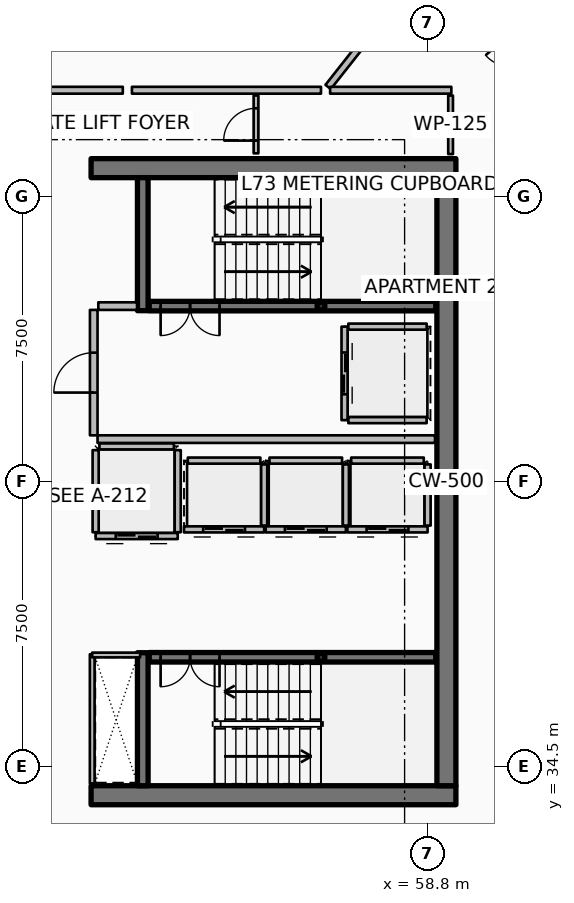
"""IFC4 building model, lengths in metres.
Left out: names, types, materials, properties, quantities, classifications, styles, units other than length and angle.
Written with IfcOpenShell. Run it as: python <this file> out.ifc"""

import sys

from ifc_helpers import new_model, si_unit, direction, frame, frame_2d, origin, origin_2d, place, context, subcontext, project, spatial, rectangle, hollow_rectangle, extrude, element, fill, save


model = new_model("IFC4")
c1 = context("Model", 3, precision=1e-05, world=origin(), true_north=direction((0.0, 1.0)))
c2 = subcontext(c1, "Body", "Model", "MODEL_VIEW")
j1 = project(units=[si_unit("LENGTHUNIT", "METRE"), si_unit("PLANEANGLEUNIT", "RADIAN")], contexts=[c1])
p1 = place(None, origin())
s1 = spatial("IfcSite", under=j1, at=p1, CompositionType="ELEMENT")
p2 = place(p1, origin())
s2 = spatial("IfcBuilding", under=s1, at=p2, CompositionType="ELEMENT")
p3 = place(p2, frame((0.0, 0.0, 290.6)))
s3 = spatial("IfcBuildingStorey", under=s2, at=p3, CompositionType="ELEMENT", Elevation=290.6)
for number, where, z_axis, x_axis in (
    (1, (49.95, 33.75, 0.0), (0.0, 0.0, 1.0), (1.0, 0.0, 0.0)),
    (2, (49.95, 50.25, 0.0), (0.0, 0.0, 1.0), (1.0, 0.0, 0.0)),
):
    element("IfcWall", number, at=place(p3, frame(where, z_axis=z_axis, x_axis=x_axis)), inside=s3, PredefinedType="SHEAR", context=c2, shape_type="SweptSolid", body=[
        extrude(rectangle(XDim=9.6, YDim=0.5, at=frame_2d((4.8, 0.0))), origin(), (0.0, 0.0, 1.0), 3.85),
    ])
p4 = place(p3, frame((59.3, 34.0, 0.0), z_axis=(0.0, 0.0, 1.0), x_axis=(0.0, 1.0, 0.0)))
e3 = element("IfcWall", 3, at=p4, inside=s3, PredefinedType="SHEAR", context=c2, shape_type="SweptSolid", body=[
    extrude(rectangle(XDim=16.0, YDim=0.5, at=frame_2d((8.0, 0.0))), origin(), (0.0, 0.0, 1.0), 3.85),
])
for number, where, z_axis, x_axis in (
    (4, (51.31, 46.5, 0.0), (0.0, 0.0, 1.0), (0.0, 1.0, 0.0)),
    (5, (51.31, 34.0, 0.0), (0.0, 0.0, 1.0), (0.0, 1.0, 0.0)),
):
    element("IfcWall", number, at=place(p3, frame(where, z_axis=z_axis, x_axis=x_axis)), inside=s3, PredefinedType="SHEAR", context=c2, shape_type="SweptSolid", body=[
        extrude(rectangle(XDim=3.5, YDim=0.28, at=frame_2d((1.75, 0.0))), origin(), (0.0, 0.0, 1.0), 3.85),
    ])
for number, where, z_axis, x_axis in (
    (6, (56.0, 46.62, 0.0), (0.0, 0.0, 1.0), (1.0, 0.0, 0.0)),
    (7, (56.0, 37.38, 0.0), (0.0, 0.0, 1.0), (1.0, 0.0, 0.0)),
):
    element("IfcColumn", number, at=place(p3, frame(where, z_axis=z_axis, x_axis=x_axis)), inside=s3, PredefinedType="COLUMN", context=c2, shape_type="SweptSolid", body=[
        extrude(hollow_rectangle(XDim=0.2, YDim=0.2, WallThickness=0.01, InnerFilletRadius=0.01, OuterFilletRadius=0.02, at=origin_2d()), origin(), (0.0, 0.0, 1.0), 1.72),
    ])
p5 = place(p3, frame((51.48, 46.62, 0.0), z_axis=(0.0, 0.0, 1.0), x_axis=(1.0, 0.0, 0.0)))
e8 = element("IfcWall", 8, at=p5, inside=s3, PredefinedType="SOLIDWALL", context=c2, shape_type="SweptSolid", body=[
    extrude(rectangle(XDim=7.54, YDim=0.25, at=frame_2d((3.77, 0.0))), origin(), (0.0, 0.0, 1.0), 3.59),
])
p6 = place(p5, frame((0.3, 0.0, 0.0)))
e9 = element("IfcOpeningElement", 9, at=p6, cuts=e8, PredefinedType="OPENING", context=c2, shape_type="SweptSolid", body=[
    extrude(rectangle(XDim=1.55, YDim=2.15, at=frame_2d((0.775, 1.075))), frame((0.0, 0.135, 0.0), z_axis=(0.0, -1.0, 0.0), x_axis=(1.0, 0.0, 0.0)), (0.0, 0.0, 1.0), 0.27),
])
p7 = place(p3, frame((51.48, 37.38, 0.0), z_axis=(0.0, 0.0, 1.0), x_axis=(1.0, 0.0, 0.0)))
e10 = element("IfcWall", 10, at=p7, inside=s3, PredefinedType="SOLIDWALL", context=c2, shape_type="SweptSolid", body=[
    extrude(rectangle(XDim=7.54, YDim=0.25, at=frame_2d((3.77, 0.0))), origin(), (0.0, 0.0, 1.0), 3.59),
])
p8 = place(p7, frame((0.3, 0.0, 0.0)))
e11 = element("IfcOpeningElement", 11, at=p8, cuts=e10, PredefinedType="OPENING", context=c2, shape_type="SweptSolid", body=[
    extrude(rectangle(XDim=1.55, YDim=2.15, at=frame_2d((0.775, 1.075))), frame((0.0, 0.135, 0.0), z_axis=(0.0, -1.0, 0.0), x_axis=(1.0, 0.0, 0.0)), (0.0, 0.0, 1.0), 0.27),
])
p9 = place(p3, frame((54.505, 40.745, 0.0), z_axis=(0.0, 0.0, 1.0), x_axis=(-1.0, 0.0, 0.0)))
e12 = element("IfcWall", 12, at=p9, inside=s3, PredefinedType="PARTITIONING", context=c2, shape_type="SweptSolid", body=[
    extrude(rectangle(XDim=2.11, YDim=0.16, at=frame_2d((1.055, 0.0))), origin(), (0.0, 0.0, 1.0), 3.59),
])
p10 = place(p9, frame((0.505, 0.0, 0.0)))
e13 = element("IfcOpeningElement", 13, at=p10, cuts=e12, PredefinedType="OPENING", context=c2, shape_type="SweptSolid", body=[
    extrude(rectangle(XDim=1.1, YDim=2.1, at=frame_2d((0.55, 1.05))), frame((0.0, 0.09, 0.0), z_axis=(0.0, -1.0, 0.0), x_axis=(1.0, 0.0, 0.0)), (0.0, 0.0, 1.0), 0.18),
])
p11 = place(p3, frame((54.505, 40.845, 0.0), z_axis=(0.0, 0.0, 1.0), x_axis=(0.0, 1.0, 0.0)))
e14 = element("IfcWall", 14, at=p11, inside=s3, PredefinedType="PARTITIONING", context=c2, shape_type="SweptSolid", body=[
    extrude(rectangle(XDim=1.61, YDim=0.16, at=frame_2d((0.805, 0.0))), origin(), (0.0, 0.0, 1.0), 3.59),
])
p12 = place(p3, frame((52.495, 42.555, 0.0), z_axis=(0.0, 0.0, 1.0), x_axis=(1.0, 0.0, 0.0)))
e15 = element("IfcWall", 15, at=p12, inside=s3, PredefinedType="PARTITIONING", context=c2, shape_type="SweptSolid", body=[
    extrude(rectangle(XDim=1.91, YDim=0.16, at=frame_2d((0.955, 0.0))), origin(), (0.0, 0.0, 1.0), 3.59),
])
p13 = place(p3, frame((56.655, 40.745, 0.0), z_axis=(0.0, 0.0, 1.0), x_axis=(-1.0, 0.0, 0.0)))
e16 = element("IfcWall", 16, at=p13, inside=s3, PredefinedType="PARTITIONING", context=c2, shape_type="SweptSolid", body=[
    extrude(rectangle(XDim=2.11, YDim=0.16, at=frame_2d((1.055, 0.0))), origin(), (0.0, 0.0, 1.0), 3.59),
])
p14 = place(p13, frame((0.505, 0.0, 0.0)))
e17 = element("IfcOpeningElement", 17, at=p14, cuts=e16, PredefinedType="OPENING", context=c2, shape_type="SweptSolid", body=[
    extrude(rectangle(XDim=1.1, YDim=2.1, at=frame_2d((0.55, 1.05))), frame((0.0, 0.09, 0.0), z_axis=(0.0, -1.0, 0.0), x_axis=(1.0, 0.0, 0.0)), (0.0, 0.0, 1.0), 0.18),
])
p15 = place(p3, frame((56.655, 40.845, 0.0), z_axis=(0.0, 0.0, 1.0), x_axis=(0.0, 1.0, 0.0)))
e18 = element("IfcWall", 18, at=p15, inside=s3, PredefinedType="PARTITIONING", context=c2, shape_type="SweptSolid", body=[
    extrude(rectangle(XDim=1.61, YDim=0.16, at=frame_2d((0.805, 0.0))), origin(), (0.0, 0.0, 1.0), 3.59),
])
p16 = place(p3, frame((54.645, 42.555, 0.0), z_axis=(0.0, 0.0, 1.0), x_axis=(1.0, 0.0, 0.0)))
e19 = element("IfcWall", 19, at=p16, inside=s3, PredefinedType="PARTITIONING", context=c2, shape_type="SweptSolid", body=[
    extrude(rectangle(XDim=1.91, YDim=0.16, at=frame_2d((0.955, 0.0))), origin(), (0.0, 0.0, 1.0), 3.59),
])
p17 = place(p3, frame((58.805, 40.745, 0.0), z_axis=(0.0, 0.0, 1.0), x_axis=(-1.0, 0.0, 0.0)))
e20 = element("IfcWall", 20, at=p17, inside=s3, PredefinedType="PARTITIONING", context=c2, shape_type="SweptSolid", body=[
    extrude(rectangle(XDim=2.11, YDim=0.16, at=frame_2d((1.055, 0.0))), origin(), (0.0, 0.0, 1.0), 3.59),
])
p18 = place(p17, frame((0.505, 0.0, 0.0)))
e21 = element("IfcOpeningElement", 21, at=p18, cuts=e20, PredefinedType="OPENING", context=c2, shape_type="SweptSolid", body=[
    extrude(rectangle(XDim=1.1, YDim=2.1, at=frame_2d((0.55, 1.05))), frame((0.0, 0.09, 0.0), z_axis=(0.0, -1.0, 0.0), x_axis=(1.0, 0.0, 0.0)), (0.0, 0.0, 1.0), 0.18),
])
p19 = place(p3, frame((58.805, 40.845, 0.0), z_axis=(0.0, 0.0, 1.0), x_axis=(0.0, 1.0, 0.0)))
e22 = element("IfcWall", 22, at=p19, inside=s3, PredefinedType="PARTITIONING", context=c2, shape_type="SweptSolid", body=[
    extrude(rectangle(XDim=1.61, YDim=0.16, at=frame_2d((0.805, 0.0))), origin(), (0.0, 0.0, 1.0), 3.59),
])
p20 = place(p3, frame((56.795, 42.555, 0.0), z_axis=(0.0, 0.0, 1.0), x_axis=(1.0, 0.0, 0.0)))
e23 = element("IfcWall", 23, at=p20, inside=s3, PredefinedType="PARTITIONING", context=c2, shape_type="SweptSolid", body=[
    extrude(rectangle(XDim=1.91, YDim=0.16, at=frame_2d((0.955, 0.0))), origin(), (0.0, 0.0, 1.0), 3.59),
])
p21 = place(p3, frame((56.62, 46.08, 0.0), z_axis=(0.0, 0.0, 1.0), x_axis=(0.0, -1.0, 0.0)))
e24 = element("IfcWall", 24, at=p21, inside=s3, PredefinedType="PARTITIONING", context=c2, shape_type="SweptSolid", body=[
    extrude(rectangle(XDim=2.46, YDim=0.16, at=frame_2d((1.23, 0.0))), origin(), (0.0, 0.0, 1.0), 3.59),
])
p22 = place(p21, frame((0.68, 0.0, 0.0)))
e25 = element("IfcOpeningElement", 25, at=p22, cuts=e24, PredefinedType="OPENING", context=c2, shape_type="SweptSolid", body=[
    extrude(rectangle(XDim=1.1, YDim=2.1, at=frame_2d((0.55, 1.05))), frame((0.0, 0.09, 0.0), z_axis=(0.0, -1.0, 0.0), x_axis=(1.0, 0.0, 0.0)), (0.0, 0.0, 1.0), 0.18),
])
for number, where, z_axis, x_axis in (
    (26, (56.72, 46.08, 0.0), (0.0, 0.0, 1.0), (1.0, 0.0, 0.0)),
    (27, (56.72, 43.62, 0.0), (0.0, 0.0, 1.0), (1.0, 0.0, 0.0)),
):
    element("IfcWall", number, at=place(p3, frame(where, z_axis=z_axis, x_axis=x_axis)), inside=s3, PredefinedType="PARTITIONING", context=c2, shape_type="SweptSolid", body=[
        extrude(rectangle(XDim=2.06, YDim=0.16, at=frame_2d((1.03, 0.0))), origin(), (0.0, 0.0, 1.0), 3.59),
    ])
p23 = place(p3, frame((52.23, 40.57, 0.0), z_axis=(0.0, 0.0, 1.0), x_axis=(-1.0, 0.0, 0.0)))
e28 = element("IfcWall", 28, at=p23, inside=s3, PredefinedType="PARTITIONING", context=c2, shape_type="SweptSolid", body=[
    extrude(rectangle(XDim=2.16, YDim=0.16, at=frame_2d((1.08, 0.0))), origin(), (0.0, 0.0, 1.0), 3.59),
])
p24 = place(p23, frame((0.53, 0.0, 0.0)))
e29 = element("IfcOpeningElement", 29, at=p24, cuts=e28, PredefinedType="OPENING", context=c2, shape_type="SweptSolid", body=[
    extrude(rectangle(XDim=1.1, YDim=2.1, at=frame_2d((0.55, 1.05))), frame((0.0, 0.09, 0.0), z_axis=(0.0, -1.0, 0.0), x_axis=(1.0, 0.0, 0.0)), (0.0, 0.0, 1.0), 0.18),
])
for number, where, z_axis, x_axis in (
    (30, (52.23, 40.67, 0.0), (0.0, 0.0, 1.0), (0.0, 1.0, 0.0)),
    (31, (50.07, 40.67, 0.0), (0.0, 0.0, 1.0), (0.0, 1.0, 0.0)),
):
    element("IfcWall", number, at=place(p3, frame(where, z_axis=z_axis, x_axis=x_axis)), inside=s3, PredefinedType="PARTITIONING", context=c2, shape_type="SweptSolid", body=[
        extrude(rectangle(XDim=2.16, YDim=0.16, at=frame_2d((1.08, 0.0))), origin(), (0.0, 0.0, 1.0), 3.59),
    ])
p25 = place(p3, frame((50.17, 42.93, 0.0), z_axis=(0.0, 0.0, 1.0), x_axis=(1.0, 0.0, 0.0)))
e32 = element("IfcWall", 32, at=p25, inside=s3, PredefinedType="PARTITIONING", context=c2, shape_type="SweptSolid", body=[
    extrude(rectangle(XDim=1.96, YDim=0.16, at=frame_2d((0.98, 0.0))), origin(), (0.0, 0.0, 1.0), 3.59),
])
p26 = place(p3, frame((50.12, 43.12, 0.0), z_axis=(0.0, 0.0, 1.0), x_axis=(1.0, 0.0, 0.0)))
e33 = element("IfcWall", 33, at=p26, inside=s3, PredefinedType="PARTITIONING", context=c2, shape_type="SweptSolid", body=[
    extrude(rectangle(XDim=8.88, YDim=0.2, at=frame_2d((4.44, 0.0))), origin(), (0.0, 0.0, 1.0), 3.59),
])
p27 = place(p3, frame((50.14, 46.62, 0.0), z_axis=(0.0, 0.0, 1.0), x_axis=(1.0, 0.0, 0.0)))
e34 = element("IfcWall", 34, at=p27, inside=s3, PredefinedType="PARTITIONING", context=c2, shape_type="SweptSolid", body=[
    extrude(rectangle(XDim=1.02, YDim=0.2, at=frame_2d((0.51, 0.0))), origin(), (0.0, 0.0, 1.0), 3.59),
])
p28 = place(p3, frame((50.02, 43.22, 0.0), z_axis=(0.0, 0.0, 1.0), x_axis=(0.0, 1.0, 0.0)))
e35 = element("IfcWall", 35, at=p28, inside=s3, PredefinedType="PARTITIONING", context=c2, shape_type="SweptSolid", body=[
    extrude(rectangle(XDim=3.3, YDim=0.2, at=frame_2d((1.65, 0.0))), origin(), (0.0, 0.0, 1.0), 3.59),
])
p29 = place(p28, frame((1.125, 0.0, 0.0)))
e36 = element("IfcOpeningElement", 36, at=p29, cuts=e35, PredefinedType="OPENING", context=c2, shape_type="SweptSolid", body=[
    extrude(rectangle(XDim=1.05, YDim=2.1, at=frame_2d((0.525, 1.05))), frame((0.0, 0.11, 0.0), z_axis=(0.0, -1.0, 0.0), x_axis=(1.0, 0.0, 0.0)), (0.0, 0.0, 1.0), 0.22),
])
p30 = place(p3, frame((49.98, 34.06, 0.0), z_axis=(0.0, 0.0, 1.0), x_axis=(0.0, 1.0, 0.0)))
e37 = element("IfcWall", 37, at=p30, inside=s3, PredefinedType="PARTITIONING", context=c2, shape_type="SweptSolid", body=[
    extrude(rectangle(XDim=3.4, YDim=0.125, at=frame_2d((1.7, 0.0))), origin(), (0.0, 0.0, 1.0), 3.03),
])
p31 = place(p3, frame((49.98, 37.44, 0.0), z_axis=(0.0, 0.0, 1.0), x_axis=(1.0, 0.0, 0.0)))
e38 = element("IfcWall", 38, at=p31, inside=s3, PredefinedType="PARTITIONING", context=c2, shape_type="SweptSolid", body=[
    extrude(rectangle(XDim=1.26, YDim=0.125, at=frame_2d((0.63, 0.0))), origin(), (0.0, 0.0, 1.0), 3.03),
])
p32 = place(p3, frame((59.41, 50.62, 0.0), z_axis=(0.0, 0.0, 1.0), x_axis=(0.0, 1.0, 0.0)))
e39 = element("IfcWall", 39, at=p32, inside=s3, PredefinedType="PARTITIONING", context=c2, shape_type="SweptSolid", body=[
    extrude(rectangle(XDim=1.54, YDim=0.125, at=frame_2d((0.77, 0.0))), origin(), (0.0, 0.0, 1.0), 3.03),
])
p33 = place(p3, frame((54.29, 50.64, 0.0), z_axis=(0.0, 0.0, 1.0), x_axis=(0.0, 1.0, 0.0)))
e40 = element("IfcWall", 40, at=p33, inside=s3, PredefinedType="PARTITIONING", context=c2, shape_type="SweptSolid", body=[
    extrude(rectangle(XDim=1.52, YDim=0.125, at=frame_2d((0.76, 0.0))), origin(), (0.0, 0.0, 1.0), 3.03),
])
p34 = place(p33, frame((0.335, 0.0, 0.0)))
e41 = element("IfcOpeningElement", 41, at=p34, cuts=e40, PredefinedType="OPENING", context=c2, shape_type="SweptSolid", body=[
    extrude(rectangle(XDim=0.85, YDim=2.06, at=frame_2d((0.425, 1.03))), frame((0.0, 0.073, 0.0), z_axis=(0.0, -1.0, 0.0), x_axis=(1.0, 0.0, 0.0)), (0.0, 0.0, 1.0), 0.145),
])
p35 = place(p3, frame((56.188, 52.386, 0.0), z_axis=(0.0, 0.0, 1.0), x_axis=(0.619097230176, 0.785314344443, 0.0)))
e42 = element("IfcWall", 42, at=p35, inside=s3, PredefinedType="PARTITIONING", context=c2, shape_type="SweptSolid", body=[
    extrude(rectangle(XDim=16.37, YDim=0.18, at=frame_2d((8.185, 0.0))), origin(), (0.0, 0.0, 1.0), 2.957),
])
p36 = place(p3, frame((56.0, 52.3, 0.0), z_axis=(0.0, 0.0, 1.0), x_axis=(-1.0, 0.0, 0.0)))
e43 = element("IfcWall", 43, at=p36, inside=s3, PredefinedType="PARTITIONING", context=c2, shape_type="SweptSolid", body=[
    extrude(rectangle(XDim=4.975, YDim=0.18, at=frame_2d((2.488, 0.0))), origin(), (0.0, 0.0, 1.0), 2.957),
])
p37 = place(p3, frame((50.785, 52.3, 0.0), z_axis=(0.0, 0.0, 1.0), x_axis=(-1.0, 0.0, 0.0)))
e44 = element("IfcWall", 44, at=p37, inside=s3, PredefinedType="PARTITIONING", context=c2, shape_type="SweptSolid", body=[
    extrude(rectangle(XDim=3.884, YDim=0.18, at=frame_2d((1.942, 0.0))), origin(), (0.0, 0.0, 1.0), 2.957),
])
p38 = place(p3, frame((59.43, 52.3, 0.0), z_axis=(0.0, 0.0, 1.0), x_axis=(-1.0, 0.0, 0.0)))
e45 = element("IfcWall", 45, at=p38, inside=s3, PredefinedType="PARTITIONING", context=c2, shape_type="SweptSolid", body=[
    extrude(rectangle(XDim=3.19, YDim=0.18, at=frame_2d((1.595, 0.0))), origin(), (0.0, 0.0, 1.0), 2.957),
])
p39 = place(p6, origin())
e46 = element("IfcDoor", 46, at=p39, inside=s3, OperationType="DOUBLE_DOOR_SINGLE_SWING", PredefinedType="DOOR", context=c2, shape_type="SweptSolid", body=[
    extrude(rectangle(XDim=1.55, YDim=2.15, at=frame_2d((0.775, 1.075))), frame((0.0, 0.025, 0.0), z_axis=(0.0, -1.0, 0.0), x_axis=(1.0, 0.0, 0.0)), (0.0, 0.0, 1.0), 0.05),
])
fill(e9, e46)
p40 = place(p8, origin())
e47 = element("IfcDoor", 47, at=p40, inside=s3, OperationType="DOUBLE_DOOR_SINGLE_SWING", PredefinedType="DOOR", context=c2, shape_type="SweptSolid", body=[
    extrude(rectangle(XDim=1.55, YDim=2.15, at=frame_2d((0.775, 1.075))), frame((0.0, 0.025, 0.0), z_axis=(0.0, -1.0, 0.0), x_axis=(1.0, 0.0, 0.0)), (0.0, 0.0, 1.0), 0.05),
])
fill(e11, e47)
p41 = place(p10, origin())
e48 = element("IfcDoor", 48, at=p41, inside=s3, OperationType="DOUBLE_DOOR_SLIDING", PredefinedType="DOOR", context=c2, shape_type="SweptSolid", body=[
    extrude(rectangle(XDim=1.1, YDim=2.1, at=frame_2d((0.55, 1.05))), frame((0.0, 0.025, 0.0), z_axis=(0.0, -1.0, 0.0), x_axis=(1.0, 0.0, 0.0)), (0.0, 0.0, 1.0), 0.05),
])
fill(e13, e48)
p42 = place(p14, origin())
e49 = element("IfcDoor", 49, at=p42, inside=s3, OperationType="DOUBLE_DOOR_SLIDING", PredefinedType="DOOR", context=c2, shape_type="SweptSolid", body=[
    extrude(rectangle(XDim=1.1, YDim=2.1, at=frame_2d((0.55, 1.05))), frame((0.0, 0.025, 0.0), z_axis=(0.0, -1.0, 0.0), x_axis=(1.0, 0.0, 0.0)), (0.0, 0.0, 1.0), 0.05),
])
fill(e17, e49)
p43 = place(p18, origin())
e50 = element("IfcDoor", 50, at=p43, inside=s3, OperationType="DOUBLE_DOOR_SLIDING", PredefinedType="DOOR", context=c2, shape_type="SweptSolid", body=[
    extrude(rectangle(XDim=1.1, YDim=2.1, at=frame_2d((0.55, 1.05))), frame((0.0, 0.025, 0.0), z_axis=(0.0, -1.0, 0.0), x_axis=(1.0, 0.0, 0.0)), (0.0, 0.0, 1.0), 0.05),
])
fill(e21, e50)
p44 = place(p22, origin())
e51 = element("IfcDoor", 51, at=p44, inside=s3, OperationType="DOUBLE_DOOR_SLIDING", PredefinedType="DOOR", context=c2, shape_type="SweptSolid", body=[
    extrude(rectangle(XDim=1.1, YDim=2.1, at=frame_2d((0.55, 1.05))), frame((0.0, 0.025, 0.0), z_axis=(0.0, -1.0, 0.0), x_axis=(1.0, 0.0, 0.0)), (0.0, 0.0, 1.0), 0.05),
])
fill(e25, e51)
p45 = place(p24, origin())
e52 = element("IfcDoor", 52, at=p45, inside=s3, OperationType="DOUBLE_DOOR_SLIDING", PredefinedType="DOOR", context=c2, shape_type="SweptSolid", body=[
    extrude(rectangle(XDim=1.1, YDim=2.1, at=frame_2d((0.55, 1.05))), frame((0.0, 0.025, 0.0), z_axis=(0.0, -1.0, 0.0), x_axis=(1.0, 0.0, 0.0)), (0.0, 0.0, 1.0), 0.05),
])
fill(e29, e52)
p46 = place(p29, origin())
e53 = element("IfcDoor", 53, at=p46, inside=s3, OperationType="SINGLE_SWING_LEFT", PredefinedType="DOOR", context=c2, shape_type="SweptSolid", body=[
    extrude(rectangle(XDim=1.05, YDim=2.1, at=frame_2d((0.525, 1.05))), frame((0.0, 0.025, 0.0), z_axis=(0.0, -1.0, 0.0), x_axis=(1.0, 0.0, 0.0)), (0.0, 0.0, 1.0), 0.05),
])
fill(e36, e53)
p47 = place(p34, origin())
e54 = element("IfcDoor", 54, at=p47, inside=s3, OperationType="SINGLE_SWING_LEFT", PredefinedType="DOOR", context=c2, shape_type="SweptSolid", body=[
    extrude(rectangle(XDim=0.85, YDim=2.06, at=frame_2d((0.425, 1.03))), frame((0.0, 0.025, 0.0), z_axis=(0.0, -1.0, 0.0), x_axis=(1.0, 0.0, 0.0)), (0.0, 0.0, 1.0), 0.05),
])
fill(e41, e54)
save(model, sys.argv[1])
